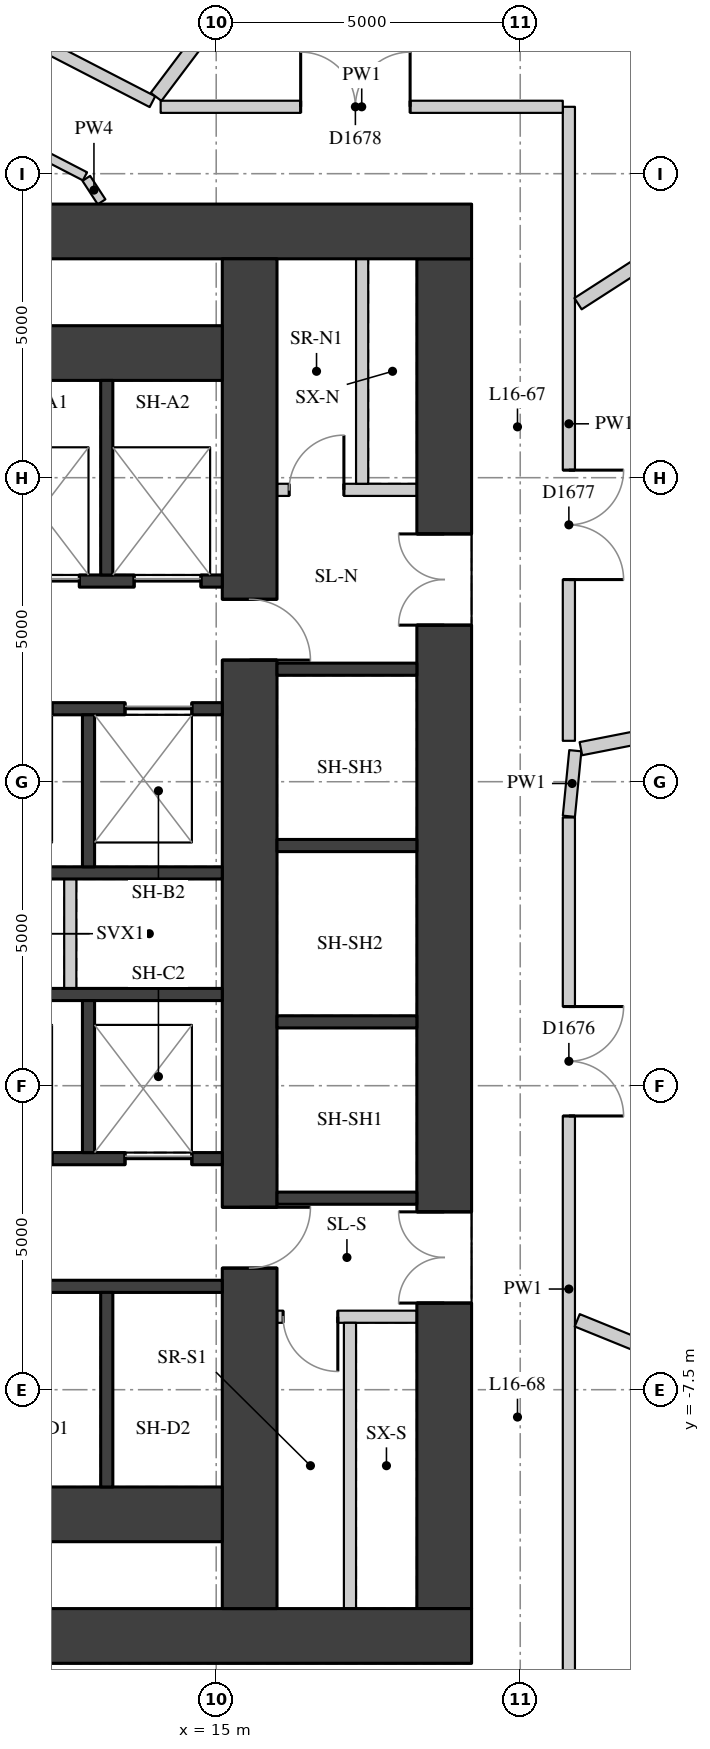
"""IFC4 building model, lengths in metres.
Left out: names, types, materials, properties, quantities, classifications, styles, units other than length and angle.
Written with IfcOpenShell. Run it as: python <this file> out.ifc"""

import sys

from ifc_helpers import new_model, si_unit, direction, frame, frame_2d, origin, place, context, subcontext, project, spatial, rectangle, extrude, element, fill, save


model = new_model("IFC4")
c1 = context("Model", 3, precision=1e-05, world=origin(), true_north=direction((0.0, 1.0)))
c2 = subcontext(c1, "Body", "Model", "MODEL_VIEW")
j1 = project(units=[si_unit("LENGTHUNIT", "METRE"), si_unit("PLANEANGLEUNIT", "RADIAN")], contexts=[c1])
p1 = place(None, origin())
s1 = spatial("IfcSite", under=j1, at=p1, CompositionType="ELEMENT")
p2 = place(p1, origin())
s2 = spatial("IfcBuilding", under=s1, at=p2, CompositionType="ELEMENT")
p3 = place(p2, frame((0.0, 0.0, 61.3)))
s3 = spatial("IfcBuildingStorey", under=s2, at=p3, CompositionType="ELEMENT", Elevation=61.3)
p4 = place(p3, frame((18.75, -11.1, 0.0), z_axis=(0.0, 0.0, 1.0), x_axis=(0.0, 1.0, 0.0)))
e1 = element("IfcWall", 1, at=p4, inside=s3, PredefinedType="SHEAR", context=c2, shape_type="SweptSolid", body=[
    extrude(rectangle(XDim=22.2, YDim=0.9, at=frame_2d((11.1, 0.0))), origin(), (0.0, 0.0, 1.0), 3.02),
])
p5 = place(p4, frame((16.175, 0.0, 0.0)))
e2 = element("IfcOpeningElement", 2, at=p5, cuts=e1, PredefinedType="OPENING", context=c2, shape_type="SweptSolid", body=[
    extrude(rectangle(XDim=1.5, YDim=2.1, at=frame_2d((0.75, 1.05))), frame((0.0, 0.46, 0.0), z_axis=(0.0, -1.0, 0.0), x_axis=(1.0, 0.0, 0.0)), (0.0, 0.0, 1.0), 0.92),
])
p6 = place(p4, frame((5.025, 0.0, 0.0)))
e3 = element("IfcOpeningElement", 3, at=p6, cuts=e1, PredefinedType="OPENING", context=c2, shape_type="SweptSolid", body=[
    extrude(rectangle(XDim=1.5, YDim=2.1, at=frame_2d((0.75, 1.05))), frame((0.0, 0.46, 0.0), z_axis=(0.0, -1.0, 0.0), x_axis=(1.0, 0.0, 0.0)), (0.0, 0.0, 1.0), 0.92),
])
for number, where, z_axis, x_axis in (
    (4, (4.0, 11.55, 0.0), (0.0, 0.0, 1.0), (1.0, 0.0, 0.0)),
    (5, (4.0, -11.55, 0.0), (0.0, 0.0, 1.0), (1.0, 0.0, 0.0)),
):
    element("IfcWall", number, at=place(p3, frame(where, z_axis=z_axis, x_axis=x_axis)), inside=s3, PredefinedType="SHEAR", context=c2, shape_type="SweptSolid", body=[
        extrude(rectangle(XDim=15.2, YDim=0.9, at=frame_2d((7.6, 0.0))), origin(), (0.0, 0.0, 1.0), 3.02),
    ])
p7 = place(p3, frame((15.55, -11.1, 0.0), z_axis=(0.0, 0.0, 1.0), x_axis=(0.0, 1.0, 0.0)))
e6 = element("IfcWall", 6, at=p7, inside=s3, PredefinedType="SHEAR", context=c2, shape_type="SweptSolid", body=[
    extrude(rectangle(XDim=22.2, YDim=0.9, at=frame_2d((11.1, 0.0))), origin(), (0.0, 0.0, 1.0), 3.02),
])
p8 = place(p7, frame((15.6, 0.0, 0.0)))
e7 = element("IfcOpeningElement", 7, at=p8, cuts=e6, PredefinedType="OPENING", context=c2, shape_type="SweptSolid", body=[
    extrude(rectangle(XDim=1.0, YDim=2.1, at=frame_2d((0.5, 1.05))), frame((0.0, 0.46, 0.0), z_axis=(0.0, -1.0, 0.0), x_axis=(1.0, 0.0, 0.0)), (0.0, 0.0, 1.0), 0.92),
])
p9 = place(p7, frame((5.6, 0.0, 0.0)))
e8 = element("IfcOpeningElement", 8, at=p9, cuts=e6, PredefinedType="OPENING", context=c2, shape_type="SweptSolid", body=[
    extrude(rectangle(XDim=1.0, YDim=2.1, at=frame_2d((0.5, 1.05))), frame((0.0, 0.46, 0.0), z_axis=(0.0, -1.0, 0.0), x_axis=(1.0, 0.0, 0.0)), (0.0, 0.0, 1.0), 0.92),
])
for number, where, z_axis, x_axis in (
    (9, (4.9, 9.55, 0.0), (0.0, 0.0, 1.0), (1.0, 0.0, 0.0)),
    (10, (4.9, -9.55, 0.0), (0.0, 0.0, 1.0), (1.0, 0.0, 0.0)),
):
    element("IfcWall", number, at=place(p3, frame(where, z_axis=z_axis, x_axis=x_axis)), inside=s3, PredefinedType="SHEAR", context=c2, shape_type="SweptSolid", body=[
        extrude(rectangle(XDim=10.2, YDim=0.9, at=frame_2d((5.1, 0.0))), origin(), (0.0, 0.0, 1.0), 3.02),
    ])
p10 = place(p3, frame((4.9, 5.8, 0.0), z_axis=(0.0, 0.0, 1.0), x_axis=(1.0, 0.0, 0.0)))
e11 = element("IfcWall", 11, at=p10, inside=s3, PredefinedType="SHEAR", context=c2, shape_type="SweptSolid", body=[
    extrude(rectangle(XDim=10.2, YDim=0.2, at=frame_2d((5.1, 0.0))), origin(), (0.0, 0.0, 1.0), 3.02),
])
p11 = place(p10, frame((6.75, 0.0, 0.0)))
e12 = element("IfcOpeningElement", 12, at=p11, cuts=e11, PredefinedType="OPENING", context=c2, shape_type="SweptSolid", body=[
    extrude(rectangle(XDim=1.1, YDim=2.1, at=frame_2d((0.55, 1.05))), frame((0.0, 0.11, 0.0), z_axis=(0.0, -1.0, 0.0), x_axis=(1.0, 0.0, 0.0)), (0.0, 0.0, 1.0), 0.22),
])
p12 = place(p10, frame((8.75, 0.0, 0.0)))
e13 = element("IfcOpeningElement", 13, at=p12, cuts=e11, PredefinedType="OPENING", context=c2, shape_type="SweptSolid", body=[
    extrude(rectangle(XDim=1.1, YDim=2.1, at=frame_2d((0.55, 1.05))), frame((0.0, 0.11, 0.0), z_axis=(0.0, -1.0, 0.0), x_axis=(1.0, 0.0, 0.0)), (0.0, 0.0, 1.0), 0.22),
])
p13 = place(p3, frame((4.9, 3.7, 0.0), z_axis=(0.0, 0.0, 1.0), x_axis=(1.0, 0.0, 0.0)))
e14 = element("IfcWall", 14, at=p13, inside=s3, PredefinedType="SHEAR", context=c2, shape_type="SweptSolid", body=[
    extrude(rectangle(XDim=10.2, YDim=0.2, at=frame_2d((5.1, 0.0))), origin(), (0.0, 0.0, 1.0), 3.02),
])
p14 = place(p13, frame((6.3, 0.0, 0.0)))
e15 = element("IfcOpeningElement", 15, at=p14, cuts=e14, PredefinedType="OPENING", context=c2, shape_type="SweptSolid", body=[
    extrude(rectangle(XDim=1.1, YDim=2.1, at=frame_2d((0.55, 1.05))), frame((0.0, 0.11, 0.0), z_axis=(0.0, -1.0, 0.0), x_axis=(1.0, 0.0, 0.0)), (0.0, 0.0, 1.0), 0.22),
])
p15 = place(p13, frame((8.6, 0.0, 0.0)))
e16 = element("IfcOpeningElement", 16, at=p15, cuts=e14, PredefinedType="OPENING", context=c2, shape_type="SweptSolid", body=[
    extrude(rectangle(XDim=1.1, YDim=2.1, at=frame_2d((0.55, 1.05))), frame((0.0, 0.11, 0.0), z_axis=(0.0, -1.0, 0.0), x_axis=(1.0, 0.0, 0.0)), (0.0, 0.0, 1.0), 0.22),
])
for number, where, z_axis, x_axis in (
    (17, (4.9, 1.0, 0.0), (0.0, 0.0, 1.0), (1.0, 0.0, 0.0)),
    (18, (4.9, -1.0, 0.0), (0.0, 0.0, 1.0), (1.0, 0.0, 0.0)),
):
    element("IfcWall", number, at=place(p3, frame(where, z_axis=z_axis, x_axis=x_axis)), inside=s3, PredefinedType="SHEAR", context=c2, shape_type="SweptSolid", body=[
        extrude(rectangle(XDim=10.2, YDim=0.2, at=frame_2d((5.1, 0.0))), origin(), (0.0, 0.0, 1.0), 3.02),
    ])
p16 = place(p3, frame((4.9, -3.7, 0.0), z_axis=(0.0, 0.0, 1.0), x_axis=(1.0, 0.0, 0.0)))
e19 = element("IfcWall", 19, at=p16, inside=s3, PredefinedType="SHEAR", context=c2, shape_type="SweptSolid", body=[
    extrude(rectangle(XDim=10.2, YDim=0.2, at=frame_2d((5.1, 0.0))), origin(), (0.0, 0.0, 1.0), 3.02),
])
p17 = place(p16, frame((6.3, 0.0, 0.0)))
e20 = element("IfcOpeningElement", 20, at=p17, cuts=e19, PredefinedType="OPENING", context=c2, shape_type="SweptSolid", body=[
    extrude(rectangle(XDim=1.1, YDim=2.1, at=frame_2d((0.55, 1.05))), frame((0.0, 0.11, 0.0), z_axis=(0.0, -1.0, 0.0), x_axis=(1.0, 0.0, 0.0)), (0.0, 0.0, 1.0), 0.22),
])
p18 = place(p16, frame((8.6, 0.0, 0.0)))
e21 = element("IfcOpeningElement", 21, at=p18, cuts=e19, PredefinedType="OPENING", context=c2, shape_type="SweptSolid", body=[
    extrude(rectangle(XDim=1.1, YDim=2.1, at=frame_2d((0.55, 1.05))), frame((0.0, 0.11, 0.0), z_axis=(0.0, -1.0, 0.0), x_axis=(1.0, 0.0, 0.0)), (0.0, 0.0, 1.0), 0.22),
])
p19 = place(p3, frame((4.9, -5.8, 0.0), z_axis=(0.0, 0.0, 1.0), x_axis=(1.0, 0.0, 0.0)))
e22 = element("IfcWall", 22, at=p19, inside=s3, PredefinedType="SHEAR", context=c2, shape_type="SweptSolid", body=[
    extrude(rectangle(XDim=10.2, YDim=0.2, at=frame_2d((5.1, 0.0))), origin(), (0.0, 0.0, 1.0), 3.02),
])
for number, where, z_axis, x_axis in (
    (23, (13.2, 5.9, 0.0), (0.0, 0.0, 1.0), (0.0, 1.0, 0.0)),
    (24, (13.2, -9.1, 0.0), (0.0, 0.0, 1.0), (0.0, 1.0, 0.0)),
):
    element("IfcWall", number, at=place(p3, frame(where, z_axis=z_axis, x_axis=x_axis)), inside=s3, PredefinedType="SHEAR", context=c2, shape_type="SweptSolid", body=[
        extrude(rectangle(XDim=3.2, YDim=0.2, at=frame_2d((1.6, 0.0))), origin(), (0.0, 0.0, 1.0), 3.02),
    ])
for number, where, z_axis, x_axis in (
    (25, (12.9, 1.1, 0.0), (0.0, 0.0, 1.0), (0.0, 1.0, 0.0)),
    (26, (12.9, -3.6, 0.0), (0.0, 0.0, 1.0), (0.0, 1.0, 0.0)),
):
    element("IfcWall", number, at=place(p3, frame(where, z_axis=z_axis, x_axis=x_axis)), inside=s3, PredefinedType="SHEAR", context=c2, shape_type="SweptSolid", body=[
        extrude(rectangle(XDim=2.5, YDim=0.2, at=frame_2d((1.25, 0.0))), origin(), (0.0, 0.0, 1.0), 3.02),
    ])
p20 = place(p3, frame((12.6, -0.9, 0.0), z_axis=(0.0, 0.0, 1.0), x_axis=(0.0, 1.0, 0.0)))
e27 = element("IfcWall", 27, at=p20, inside=s3, PredefinedType="PARTITIONING", context=c2, shape_type="SweptSolid", body=[
    extrude(rectangle(XDim=1.8, YDim=0.2, at=frame_2d((0.9, 0.0))), origin(), (0.0, 0.0, 1.0), 3.02),
])
for number, where, z_axis, x_axis in (
    (28, (16.0, -4.35, 0.0), (0.0, 0.0, 1.0), (1.0, 0.0, 0.0)),
    (29, (16.0, -1.45, 0.0), (0.0, 0.0, 1.0), (1.0, 0.0, 0.0)),
    (30, (16.0, 1.45, 0.0), (0.0, 0.0, 1.0), (1.0, 0.0, 0.0)),
    (31, (16.0, 4.35, 0.0), (0.0, 0.0, 1.0), (1.0, 0.0, 0.0)),
):
    element("IfcWall", number, at=place(p3, frame(where, z_axis=z_axis, x_axis=x_axis)), inside=s3, PredefinedType="SHEAR", context=c2, shape_type="SweptSolid", body=[
        extrude(rectangle(XDim=2.3, YDim=0.2, at=frame_2d((1.15, 0.0))), origin(), (0.0, 0.0, 1.0), 3.02),
    ])
p21 = place(p3, frame((16.0, 7.3, 0.0), z_axis=(0.0, 0.0, 1.0), x_axis=(1.0, 0.0, 0.0)))
e32 = element("IfcWall", 32, at=p21, inside=s3, PredefinedType="PARTITIONING", context=c2, shape_type="SweptSolid", body=[
    extrude(rectangle(XDim=2.3, YDim=0.2, at=frame_2d((1.15, 0.0))), origin(), (0.0, 0.0, 1.0), 3.02),
])
p22 = place(p21, frame((0.2, 0.0, 0.0)))
e33 = element("IfcOpeningElement", 33, at=p22, cuts=e32, PredefinedType="OPENING", context=c2, shape_type="SweptSolid", body=[
    extrude(rectangle(XDim=0.9, YDim=2.1, at=frame_2d((0.45, 1.05))), frame((0.0, 0.11, 0.0), z_axis=(0.0, -1.0, 0.0), x_axis=(1.0, 0.0, 0.0)), (0.0, 0.0, 1.0), 0.22),
])
p23 = place(p3, frame((17.4, 7.4, 0.0), z_axis=(0.0, 0.0, 1.0), x_axis=(0.0, 1.0, 0.0)))
e34 = element("IfcWall", 34, at=p23, inside=s3, PredefinedType="PARTITIONING", context=c2, shape_type="SweptSolid", body=[
    extrude(rectangle(XDim=3.7, YDim=0.2, at=frame_2d((1.85, 0.0))), origin(), (0.0, 0.0, 1.0), 3.02),
])
p24 = place(p3, frame((16.0, -6.3, 0.0), z_axis=(0.0, 0.0, 1.0), x_axis=(1.0, 0.0, 0.0)))
e35 = element("IfcWall", 35, at=p24, inside=s3, PredefinedType="PARTITIONING", context=c2, shape_type="SweptSolid", body=[
    extrude(rectangle(XDim=2.3, YDim=0.2, at=frame_2d((1.15, 0.0))), origin(), (0.0, 0.0, 1.0), 3.02),
])
p25 = place(p24, frame((0.1, 0.0, 0.0)))
e36 = element("IfcOpeningElement", 36, at=p25, cuts=e35, PredefinedType="OPENING", context=c2, shape_type="SweptSolid", body=[
    extrude(rectangle(XDim=0.9, YDim=2.1, at=frame_2d((0.45, 1.05))), frame((0.0, 0.11, 0.0), z_axis=(0.0, -1.0, 0.0), x_axis=(1.0, 0.0, 0.0)), (0.0, 0.0, 1.0), 0.22),
])
p26 = place(p3, frame((17.2, -11.1, 0.0), z_axis=(0.0, 0.0, 1.0), x_axis=(0.0, 1.0, 0.0)))
e37 = element("IfcWall", 37, at=p26, inside=s3, PredefinedType="PARTITIONING", context=c2, shape_type="SweptSolid", body=[
    extrude(rectangle(XDim=4.7, YDim=0.2, at=frame_2d((2.35, 0.0))), origin(), (0.0, 0.0, 1.0), 3.02),
])
p27 = place(p3, frame((20.8, 13.6, 0.0), z_axis=(0.0, 0.0, 1.0), x_axis=(0.0, -1.0, 0.0)))
e38 = element("IfcWall", 38, at=p27, inside=s3, PredefinedType="PARTITIONING", context=c2, shape_type="SweptSolid", body=[
    extrude(rectangle(XDim=10.428, YDim=0.2, at=frame_2d((5.214, 0.0))), origin(), (0.0, 0.0, 1.0), 3.02),
])
p28 = place(p27, frame((5.976, 0.0, 0.0)))
e39 = element("IfcOpeningElement", 39, at=p28, cuts=e38, PredefinedType="OPENING", context=c2, shape_type="SweptSolid", body=[
    extrude(rectangle(XDim=1.8, YDim=2.1, at=frame_2d((0.9, 1.05))), frame((0.0, 0.11, 0.0), z_axis=(0.0, -1.0, 0.0), x_axis=(1.0, 0.0, 0.0)), (0.0, 0.0, 1.0), 0.22),
])
p29 = place(p3, frame((20.906, 3.01, 0.0), z_axis=(0.0, 0.0, 1.0), x_axis=(-0.09782971129, -0.995203169001, 0.0)))
e40 = element("IfcWall", 40, at=p29, inside=s3, PredefinedType="PARTITIONING", context=c2, shape_type="SweptSolid", body=[
    extrude(rectangle(XDim=1.083, YDim=0.2, at=frame_2d((0.542, 0.0))), origin(), (0.0, 0.0, 1.0), 3.02),
])
p30 = place(p3, frame((20.8, 1.912, 0.0), z_axis=(0.0, 0.0, 1.0), x_axis=(0.0, -1.0, 0.0)))
e41 = element("IfcWall", 41, at=p30, inside=s3, PredefinedType="PARTITIONING", context=c2, shape_type="SweptSolid", body=[
    extrude(rectangle(XDim=15.512, YDim=0.2, at=frame_2d((7.756, 0.0))), origin(), (0.0, 0.0, 1.0), 3.02),
])
p31 = place(p30, frame((3.11, 0.0, 0.0)))
e42 = element("IfcOpeningElement", 42, at=p31, cuts=e41, PredefinedType="OPENING", context=c2, shape_type="SweptSolid", body=[
    extrude(rectangle(XDim=1.8, YDim=2.1, at=frame_2d((0.9, 1.05))), frame((0.0, 0.11, 0.0), z_axis=(0.0, -1.0, 0.0), x_axis=(1.0, 0.0, 0.0)), (0.0, 0.0, 1.0), 0.22),
])
p32 = place(p3, frame((7.606, 16.961, 0.0), z_axis=(0.0, 0.0, 1.0), x_axis=(0.888519518851, -0.45883882205, 0.0)))
e43 = element("IfcWall", 43, at=p32, inside=s3, PredefinedType="PARTITIONING", context=c2, shape_type="SweptSolid", body=[
    extrude(rectangle(XDim=7.142, YDim=0.2, at=frame_2d((3.571, 0.0))), origin(), (0.0, 0.0, 1.0), 3.02),
])
p33 = place(p32, frame((3.342, 0.0, 0.0)))
e44 = element("IfcOpeningElement", 44, at=p33, cuts=e43, PredefinedType="OPENING", context=c2, shape_type="SweptSolid", body=[
    extrude(rectangle(XDim=1.1, YDim=2.1, at=frame_2d((0.55, 1.05))), frame((0.0, 0.11, 0.0), z_axis=(0.0, -1.0, 0.0), x_axis=(1.0, 0.0, 0.0)), (0.0, 0.0, 1.0), 0.22),
])
p34 = place(p3, frame((14.086, 13.6, 0.0), z_axis=(0.0, 0.0, 1.0), x_axis=(1.0, 0.0, 0.0)))
e45 = element("IfcWall", 45, at=p34, inside=s3, PredefinedType="PARTITIONING", context=c2, shape_type="SweptSolid", body=[
    extrude(rectangle(XDim=6.614, YDim=0.2, at=frame_2d((3.307, 0.0))), origin(), (0.0, 0.0, 1.0), 3.02),
])
p35 = place(p34, frame((2.303, 0.0, 0.0)))
e46 = element("IfcOpeningElement", 46, at=p35, cuts=e45, PredefinedType="OPENING", context=c2, shape_type="SweptSolid", body=[
    extrude(rectangle(XDim=1.8, YDim=2.1, at=frame_2d((0.9, 1.05))), frame((0.0, 0.11, 0.0), z_axis=(0.0, -1.0, 0.0), x_axis=(1.0, 0.0, 0.0)), (0.0, 0.0, 1.0), 0.22),
])
p36 = place(p3, frame((7.012, 15.467, 0.0), z_axis=(0.0, 0.0, 1.0), x_axis=(0.888509096081, -0.458859004685, 0.0)))
e47 = element("IfcWall", 47, at=p36, inside=s3, PredefinedType="PARTITIONING", context=c2, shape_type="SweptSolid", body=[
    extrude(rectangle(XDim=6.561, YDim=0.15, at=frame_2d((3.281, 0.0))), origin(), (0.0, 0.0, 1.0), 3.02),
])
p37 = place(p3, frame((12.864, 12.423, 0.0), z_axis=(0.0, 0.0, 1.0), x_axis=(0.545733799108, -0.837958603101, 0.0)))
e48 = element("IfcWall", 48, at=p37, inside=s3, PredefinedType="PARTITIONING", context=c2, shape_type="SweptSolid", body=[
    extrude(rectangle(XDim=0.46, YDim=0.15, at=frame_2d((0.23, 0.0))), origin(), (0.0, 0.0, 1.0), 3.02),
])
p38 = place(p3, frame((27.085, 4.24, 0.0), z_axis=(0.0, 0.0, 1.0), x_axis=(-0.981208260902, -0.192951674616, 0.0)))
e49 = element("IfcWall", 49, at=p38, inside=s3, PredefinedType="PARTITIONING", context=c2, shape_type="SweptSolid", body=[
    extrude(rectangle(XDim=6.204, YDim=0.22, at=frame_2d((3.102, 0.0))), origin(), (0.0, 0.0, 1.0), 2.47),
])
p39 = place(p3, frame((23.835, 12.219, 0.0), z_axis=(0.0, 0.0, 1.0), x_axis=(-0.840694872373, -0.541509124176, 0.0)))
e50 = element("IfcWall", 50, at=p39, inside=s3, PredefinedType="PARTITIONING", context=c2, shape_type="SweptSolid", body=[
    extrude(rectangle(XDim=3.43, YDim=0.22, at=frame_2d((1.715, 0.0))), origin(), (0.0, 0.0, 1.0), 3.02),
])
p40 = place(p3, frame((16.927, 17.638, 0.0), z_axis=(0.0, 0.0, 1.0), x_axis=(-0.601159395391, -0.799129139334, 0.0)))
e51 = element("IfcWall", 51, at=p40, inside=s3, PredefinedType="PARTITIONING", context=c2, shape_type="SweptSolid", body=[
    extrude(rectangle(XDim=4.849, YDim=0.22, at=frame_2d((2.425, 0.0))), origin(), (0.0, 0.0, 1.0), 3.02),
])
p41 = place(p3, frame((25.851, -8.354, 0.0), z_axis=(0.0, 0.0, 1.0), x_axis=(-0.926546814299, 0.376179479653, 0.0)))
e52 = element("IfcWall", 52, at=p41, inside=s3, PredefinedType="PARTITIONING", context=c2, shape_type="SweptSolid", body=[
    extrude(rectangle(XDim=5.304, YDim=0.22, at=frame_2d((2.652, 0.0))), origin(), (0.0, 0.0, 1.0), 3.02),
])
p42 = place(p5, origin())
e53 = element("IfcDoor", 53, at=p42, inside=s3, OperationType="DOUBLE_DOOR_SINGLE_SWING", PredefinedType="DOOR", context=c2, shape_type="SweptSolid", body=[
    extrude(rectangle(XDim=1.5, YDim=2.1, at=frame_2d((0.75, 1.05))), frame((0.0, 0.025, 0.0), z_axis=(0.0, -1.0, 0.0), x_axis=(1.0, 0.0, 0.0)), (0.0, 0.0, 1.0), 0.05),
])
fill(e2, e53)
p43 = place(p6, origin())
e54 = element("IfcDoor", 54, at=p43, inside=s3, OperationType="DOUBLE_DOOR_SINGLE_SWING", PredefinedType="DOOR", context=c2, shape_type="SweptSolid", body=[
    extrude(rectangle(XDim=1.5, YDim=2.1, at=frame_2d((0.75, 1.05))), frame((0.0, 0.025, 0.0), z_axis=(0.0, -1.0, 0.0), x_axis=(1.0, 0.0, 0.0)), (0.0, 0.0, 1.0), 0.05),
])
fill(e3, e54)
p44 = place(p11, origin())
e55 = element("IfcDoor", 55, at=p44, inside=s3, OperationType="DOUBLE_DOOR_SLIDING", PredefinedType="DOOR", context=c2, shape_type="SweptSolid", body=[
    extrude(rectangle(XDim=1.1, YDim=2.1, at=frame_2d((0.55, 1.05))), frame((0.0, 0.025, 0.0), z_axis=(0.0, -1.0, 0.0), x_axis=(1.0, 0.0, 0.0)), (0.0, 0.0, 1.0), 0.05),
])
fill(e12, e55)
p45 = place(p12, origin())
e56 = element("IfcDoor", 56, at=p45, inside=s3, OperationType="DOUBLE_DOOR_SLIDING", PredefinedType="DOOR", context=c2, shape_type="SweptSolid", body=[
    extrude(rectangle(XDim=1.1, YDim=2.1, at=frame_2d((0.55, 1.05))), frame((0.0, 0.025, 0.0), z_axis=(0.0, -1.0, 0.0), x_axis=(1.0, 0.0, 0.0)), (0.0, 0.0, 1.0), 0.05),
])
fill(e13, e56)
p46 = place(p15, origin())
e57 = element("IfcDoor", 57, at=p46, inside=s3, OperationType="DOUBLE_DOOR_SLIDING", PredefinedType="DOOR", context=c2, shape_type="SweptSolid", body=[
    extrude(rectangle(XDim=1.1, YDim=2.1, at=frame_2d((0.55, 1.05))), frame((0.0, 0.025, 0.0), z_axis=(0.0, -1.0, 0.0), x_axis=(1.0, 0.0, 0.0)), (0.0, 0.0, 1.0), 0.05),
])
fill(e16, e57)
p47 = place(p18, origin())
e58 = element("IfcDoor", 58, at=p47, inside=s3, OperationType="DOUBLE_DOOR_SLIDING", PredefinedType="DOOR", context=c2, shape_type="SweptSolid", body=[
    extrude(rectangle(XDim=1.1, YDim=2.1, at=frame_2d((0.55, 1.05))), frame((0.0, 0.025, 0.0), z_axis=(0.0, -1.0, 0.0), x_axis=(1.0, 0.0, 0.0)), (0.0, 0.0, 1.0), 0.05),
])
fill(e21, e58)
p48 = place(p8, origin())
e59 = element("IfcDoor", 59, at=p48, inside=s3, OperationType="SINGLE_SWING_RIGHT", PredefinedType="DOOR", context=c2, shape_type="SweptSolid", body=[
    extrude(rectangle(XDim=1.0, YDim=2.1, at=frame_2d((0.5, 1.05))), frame((0.0, 0.025, 0.0), z_axis=(0.0, -1.0, 0.0), x_axis=(1.0, 0.0, 0.0)), (0.0, 0.0, 1.0), 0.05),
])
fill(e7, e59)
p49 = place(p22, origin())
e60 = element("IfcDoor", 60, at=p49, inside=s3, OperationType="SINGLE_SWING_RIGHT", PredefinedType="DOOR", context=c2, shape_type="SweptSolid", body=[
    extrude(rectangle(XDim=0.9, YDim=2.1, at=frame_2d((0.45, 1.05))), frame((0.0, 0.025, 0.0), z_axis=(0.0, -1.0, 0.0), x_axis=(1.0, 0.0, 0.0)), (0.0, 0.0, 1.0), 0.05),
])
fill(e33, e60)
p50 = place(p9, origin())
e61 = element("IfcDoor", 61, at=p50, inside=s3, OperationType="SINGLE_SWING_LEFT", PredefinedType="DOOR", context=c2, shape_type="SweptSolid", body=[
    extrude(rectangle(XDim=1.0, YDim=2.1, at=frame_2d((0.5, 1.05))), frame((0.0, 0.025, 0.0), z_axis=(0.0, -1.0, 0.0), x_axis=(1.0, 0.0, 0.0)), (0.0, 0.0, 1.0), 0.05),
])
fill(e8, e61)
p51 = place(p25, origin())
e62 = element("IfcDoor", 62, at=p51, inside=s3, OperationType="SINGLE_SWING_LEFT", PredefinedType="DOOR", context=c2, shape_type="SweptSolid", body=[
    extrude(rectangle(XDim=0.9, YDim=2.1, at=frame_2d((0.45, 1.05))), frame((0.0, 0.025, 0.0), z_axis=(0.0, -1.0, 0.0), x_axis=(1.0, 0.0, 0.0)), (0.0, 0.0, 1.0), 0.05),
])
fill(e36, e62)
p52 = place(p31, origin())
e63 = element("IfcDoor", 63, at=p52, inside=s3, OperationType="DOUBLE_DOOR_SINGLE_SWING", PredefinedType="DOOR", context=c2, shape_type="SweptSolid", body=[
    extrude(rectangle(XDim=1.8, YDim=2.1, at=frame_2d((0.9, 1.05))), frame((0.0, 0.025, 0.0), z_axis=(0.0, -1.0, 0.0), x_axis=(1.0, 0.0, 0.0)), (0.0, 0.0, 1.0), 0.05),
])
fill(e42, e63)
p53 = place(p28, origin())
e64 = element("IfcDoor", 64, at=p53, inside=s3, OperationType="DOUBLE_DOOR_SINGLE_SWING", PredefinedType="DOOR", context=c2, shape_type="SweptSolid", body=[
    extrude(rectangle(XDim=1.8, YDim=2.1, at=frame_2d((0.9, 1.05))), frame((0.0, 0.025, 0.0), z_axis=(0.0, -1.0, 0.0), x_axis=(1.0, 0.0, 0.0)), (0.0, 0.0, 1.0), 0.05),
])
fill(e39, e64)
p54 = place(p35, origin())
e65 = element("IfcDoor", 65, at=p54, inside=s3, OperationType="DOUBLE_DOOR_SINGLE_SWING", PredefinedType="DOOR", context=c2, shape_type="SweptSolid", body=[
    extrude(rectangle(XDim=1.8, YDim=2.1, at=frame_2d((0.9, 1.05))), frame((0.0, 0.025, 0.0), z_axis=(0.0, -1.0, 0.0), x_axis=(1.0, 0.0, 0.0)), (0.0, 0.0, 1.0), 0.05),
])
fill(e46, e65)
save(model, sys.argv[1])
